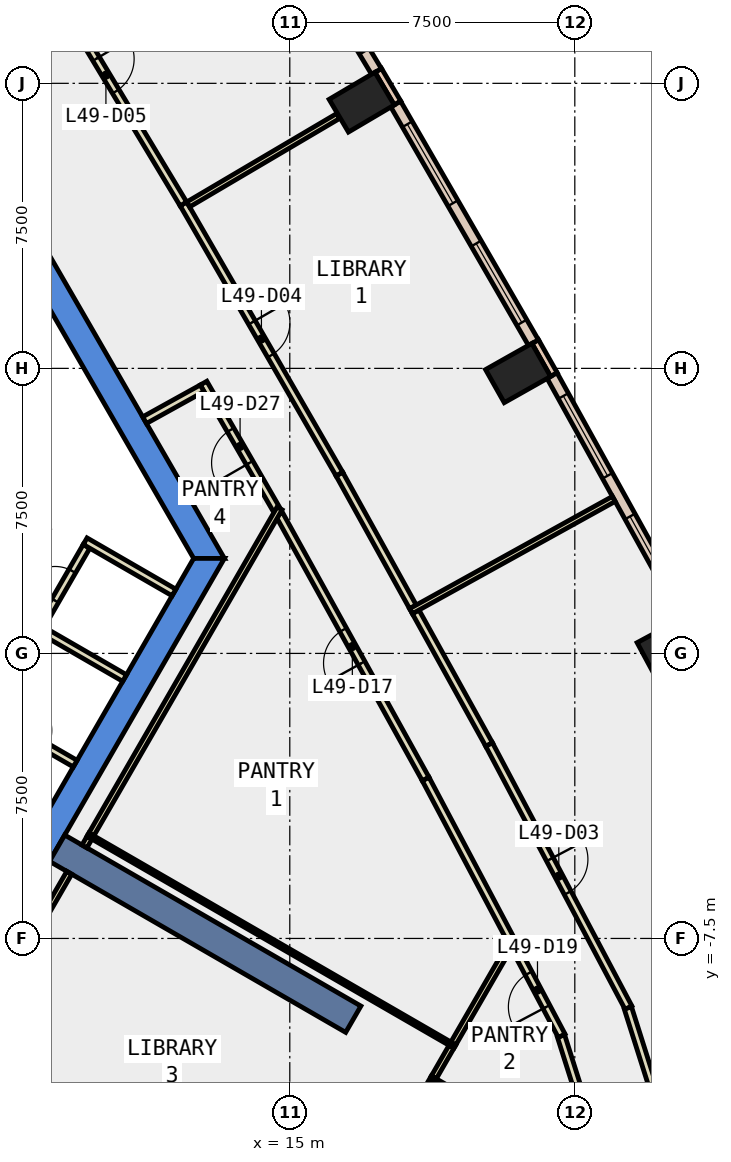
"""IFC4 building model, lengths in metres.
Left out: names, types, materials, properties, quantities, classifications, styles, units other than length and angle.
Written with IfcOpenShell. Run it as: python <this file> out.ifc"""

import sys

from ifc_helpers import new_model, si_unit, direction, frame, frame_2d, origin, origin_2d, place, context, subcontext, project, spatial, polyline, rectangle, outline, extrude, element, fill, save


model = new_model("IFC4")
c1 = context("Model", 3, precision=1e-05, world=origin(), true_north=direction((0.0, 1.0)))
c2 = subcontext(c1, "Body", "Model", "MODEL_VIEW")
j1 = project(units=[si_unit("LENGTHUNIT", "METRE"), si_unit("PLANEANGLEUNIT", "RADIAN")], contexts=[c1])
p1 = place(None, origin())
s1 = spatial("IfcSite", under=j1, at=p1, CompositionType="ELEMENT")
p2 = place(p1, origin())
s2 = spatial("IfcBuilding", under=s1, at=p2, CompositionType="ELEMENT")
p3 = place(p2, frame((0.0, 0.0, 219.2)))
s3 = spatial("IfcBuildingStorey", under=s2, at=p3, CompositionType="ELEMENT", Elevation=219.2)
for number, where, z_axis, x_axis in (
    (1, (24.993, 0.175, -0.4), (0.0, 0.0, 1.0), (-0.474, 0.88, 0.0)),
    (2, (21.007, 7.377, -0.4), (0.0, 0.0, 1.0), (-0.491, 0.871, 0.0)),
    (3, (16.892, 14.504, -0.4), (0.0, 0.0, 1.0), (-0.509, 0.861, 0.0)),
):
    element("IfcColumn", number, at=place(p3, frame(where, z_axis=z_axis, x_axis=x_axis)), inside=s3, PredefinedType="COLUMN", context=c2, shape_type="SweptSolid", body=[
        extrude(rectangle(XDim=1.0, YDim=1.4, at=origin_2d()), origin(), (0.0, 0.0, 1.0), 4.2),
    ])
p4 = place(p3, frame((0.0, 0.0, -0.4)))
e4 = element("IfcWall", 4, at=p4, inside=s3, PredefinedType="SHEAR", context=c2, shape_type="SweptSolid", body=[
    extrude(outline(polyline([(8.084, 11.498), (7.478, 11.148), (12.471, 2.5), (13.279, 2.5), (8.084, 11.498)])), origin(), (0.0, 0.0, 1.0), 4.2),
])
p5 = place(p3, frame((0.0, 0.0, -0.4)))
e5 = element("IfcWall", 5, at=p5, inside=s3, PredefinedType="SHEAR", context=c2, shape_type="SweptSolid", body=[
    extrude(outline(polyline([(6.64, -9.0), (13.279, 2.5), (12.471, 2.5), (6.235, -8.3), (6.64, -9.0)])), origin(), (0.0, 0.0, 1.0), 4.2),
])
p6 = place(p3, frame((8.877, -5.125, -0.4), z_axis=(0.0, 0.0, 1.0), x_axis=(0.866017533419, -0.500013631625, 0.0)))
e6 = element("IfcWall", 6, at=p6, inside=s3, PredefinedType="SHEAR", context=c2, shape_type="SweptSolid", body=[
    extrude(rectangle(XDim=9.0, YDim=0.8, at=frame_2d((4.5, 0.0))), origin(), (0.0, 0.0, 1.0), 4.2),
])
p7 = place(p3, frame((21.95, 7.334, 0.0), z_axis=(0.0, 0.0, 1.0), x_axis=(-0.491743606947, 0.87074004446, 0.0)))
e7 = element("IfcWall", 7, at=p7, inside=s3, PredefinedType="STANDARD", context=c2, shape_type="SweptSolid", body=[
    extrude(rectangle(XDim=1.0, YDim=0.2, at=frame_2d((0.5, 0.0))), origin(), (0.0, 0.0, 1.0), 3.8),
])
p8 = place(p3, frame((17.835, 14.481, 0.0), z_axis=(0.0, 0.0, 1.0), x_axis=(-0.508161541526, 0.861261776531, 0.0)))
e8 = element("IfcWall", 8, at=p8, inside=s3, PredefinedType="STANDARD", context=c2, shape_type="SweptSolid", body=[
    extrude(rectangle(XDim=1.0, YDim=0.2, at=frame_2d((0.5, 0.0))), origin(), (0.0, 0.0, 1.0), 3.8),
])
p9 = place(p3, frame((25.411, 0.968, 0.0), z_axis=(0.0, 0.0, 1.0), x_axis=(-0.484163461668, 0.87497756679, 0.0)))
e9 = element("IfcWall", 9, at=p9, inside=s3, PredefinedType="STANDARD", context=c2, shape_type="SweptSolid", body=[
    extrude(rectangle(XDim=7.247, YDim=0.3, at=frame_2d((3.624, 0.0))), origin(), (0.0, 0.0, 1.0), 3.8),
])
p10 = place(p9, frame((0.612, 0.0, 0.9)))
e10 = element("IfcOpeningElement", 10, at=p10, cuts=e9, PredefinedType="OPENING", context=c2, shape_type="SweptSolid", body=[
    extrude(rectangle(XDim=2.4, YDim=2.6, at=frame_2d((1.2, 1.3))), frame((0.0, 0.16, 0.0), z_axis=(0.0, -1.0, 0.0), x_axis=(1.0, 0.0, 0.0)), (0.0, 0.0, 1.0), 0.32),
])
p11 = place(p9, frame((4.235, 0.0, 0.9)))
e11 = element("IfcOpeningElement", 11, at=p11, cuts=e9, PredefinedType="OPENING", context=c2, shape_type="SweptSolid", body=[
    extrude(rectangle(XDim=2.4, YDim=2.6, at=frame_2d((1.2, 1.3))), frame((0.0, 0.16, 0.0), z_axis=(0.0, -1.0, 0.0), x_axis=(1.0, 0.0, 0.0)), (0.0, 0.0, 1.0), 0.32),
])
p12 = place(p3, frame((21.411, 8.177, 0.0), z_axis=(0.0, 0.0, 1.0), x_axis=(-0.499968351115, 0.866043675505, 0.0)))
e12 = element("IfcWall", 12, at=p12, inside=s3, PredefinedType="STANDARD", context=c2, shape_type="SweptSolid", body=[
    extrude(rectangle(XDim=7.248, YDim=0.3, at=frame_2d((3.624, 0.0))), origin(), (0.0, 0.0, 1.0), 3.8),
])
p13 = place(p12, frame((0.612, 0.0, 0.9)))
e13 = element("IfcOpeningElement", 13, at=p13, cuts=e12, PredefinedType="OPENING", context=c2, shape_type="SweptSolid", body=[
    extrude(rectangle(XDim=2.4, YDim=2.6, at=frame_2d((1.2, 1.3))), frame((0.0, 0.16, 0.0), z_axis=(0.0, -1.0, 0.0), x_axis=(1.0, 0.0, 0.0)), (0.0, 0.0, 1.0), 0.32),
])
p14 = place(p12, frame((4.236, 0.0, 0.9)))
e14 = element("IfcOpeningElement", 14, at=p14, cuts=e12, PredefinedType="OPENING", context=c2, shape_type="SweptSolid", body=[
    extrude(rectangle(XDim=2.4, YDim=2.6, at=frame_2d((1.2, 1.3))), frame((0.0, 0.16, 0.0), z_axis=(0.0, -1.0, 0.0), x_axis=(1.0, 0.0, 0.0)), (0.0, 0.0, 1.0), 0.32),
])
p15 = place(p3, frame((17.281, 15.313, 0.0), z_axis=(0.0, 0.0, 1.0), x_axis=(-0.515560283412, 0.856853309597, 0.0)))
e15 = element("IfcWall", 15, at=p15, inside=s3, PredefinedType="STANDARD", context=c2, shape_type="SweptSolid", body=[
    extrude(rectangle(XDim=7.249, YDim=0.3, at=frame_2d((3.624, 0.0))), origin(), (0.0, 0.0, 1.0), 3.8),
])
p16 = place(p15, frame((0.612, 0.0, 0.9)))
e16 = element("IfcOpeningElement", 16, at=p16, cuts=e15, PredefinedType="OPENING", context=c2, shape_type="SweptSolid", body=[
    extrude(rectangle(XDim=2.4, YDim=2.6, at=frame_2d((1.2, 1.3))), frame((0.0, 0.16, 0.0), z_axis=(0.0, -1.0, 0.0), x_axis=(1.0, 0.0, 0.0)), (0.0, 0.0, 1.0), 0.32),
])
p17 = place(p15, frame((4.236, 0.0, 0.9)))
e17 = element("IfcOpeningElement", 17, at=p17, cuts=e15, PredefinedType="OPENING", context=c2, shape_type="SweptSolid", body=[
    extrude(rectangle(XDim=2.4, YDim=2.6, at=frame_2d((1.2, 1.3))), frame((0.0, 0.16, 0.0), z_axis=(0.0, -1.0, 0.0), x_axis=(1.0, 0.0, 0.0)), (0.0, 0.0, 1.0), 0.32),
])
p18 = place(p3, frame((14.652, 3.783, 0.0), z_axis=(0.0, 0.0, 1.0), x_axis=(-0.499821427992, 0.866128477837, 0.0)))
e18 = element("IfcWall", 18, at=p18, inside=s3, PredefinedType="PARTITIONING", context=c2, shape_type="SweptSolid", body=[
    extrude(rectangle(XDim=3.844, YDim=0.2, at=frame_2d((1.922, 0.0))), origin(), (0.0, 0.0, 1.0), 3.8),
])
p19 = place(p18, frame((1.421, 0.0, 0.0)))
e19 = element("IfcOpeningElement", 19, at=p19, cuts=e18, PredefinedType="OPENING", context=c2, shape_type="SweptSolid", body=[
    extrude(rectangle(XDim=1.0, YDim=2.1, at=frame_2d((0.5, 1.05))), frame((0.0, 0.11, 0.0), z_axis=(0.0, -1.0, 0.0), x_axis=(1.0, 0.0, 0.0)), (0.0, 0.0, 1.0), 0.22),
])
p20 = place(p3, frame((12.693, 6.976, 0.0), z_axis=(0.0, 0.0, 1.0), x_axis=(-0.874908151187, -0.484288887944, 0.0)))
e20 = element("IfcWall", 20, at=p20, inside=s3, PredefinedType="PARTITIONING", context=c2, shape_type="SweptSolid", body=[
    extrude(rectangle(XDim=1.731, YDim=0.2, at=frame_2d((0.865, 0.0))), origin(), (0.0, 0.0, 1.0), 3.8),
])
p21 = place(p3, frame((20.882, -7.659, 0.0), z_axis=(0.0, 0.0, 1.0), x_axis=(-0.468206254133, 0.883619207346, 0.0)))
e21 = element("IfcWall", 21, at=p21, inside=s3, PredefinedType="PARTITIONING", context=c2, shape_type="SweptSolid", body=[
    extrude(rectangle(XDim=4.93, YDim=0.2, at=frame_2d((2.465, 0.0))), origin(), (0.0, 0.0, 1.0), 3.8),
])
p22 = place(p3, frame((18.574, -3.303, 0.0), z_axis=(0.0, 0.0, 1.0), x_axis=(-0.484239190765, 0.874935658279, 0.0)))
e22 = element("IfcWall", 22, at=p22, inside=s3, PredefinedType="PARTITIONING", context=c2, shape_type="SweptSolid", body=[
    extrude(rectangle(XDim=7.963, YDim=0.2, at=frame_2d((3.981, 0.0))), origin(), (0.0, 0.0, 1.0), 3.8),
])
p23 = place(p22, frame((3.482, 0.0, 0.0)))
e23 = element("IfcOpeningElement", 23, at=p23, cuts=e22, PredefinedType="OPENING", context=c2, shape_type="SweptSolid", body=[
    extrude(rectangle(XDim=1.0, YDim=2.1, at=frame_2d((0.5, 1.05))), frame((0.0, 0.11, 0.0), z_axis=(0.0, -1.0, 0.0), x_axis=(1.0, 0.0, 0.0)), (0.0, 0.0, 1.0), 0.22),
])
p24 = place(p3, frame((22.833, -12.262, 0.0), z_axis=(0.0, 0.0, 1.0), x_axis=(-0.302262657712, 0.953224677478, 0.0)))
e24 = element("IfcWall", 24, at=p24, inside=s3, PredefinedType="PARTITIONING", context=c2, shape_type="SweptSolid", body=[
    extrude(rectangle(XDim=2.303, YDim=0.2, at=frame_2d((1.151, 0.0))), origin(), (0.0, 0.0, 1.0), 3.8),
])
p25 = place(p3, frame((22.154, -10.06, 0.0), z_axis=(0.0, 0.0, 1.0), x_axis=(-0.468114756541, 0.883667683413, 0.0)))
e25 = element("IfcWall", 25, at=p25, inside=s3, PredefinedType="PARTITIONING", context=c2, shape_type="SweptSolid", body=[
    extrude(rectangle(XDim=2.717, YDim=0.2, at=frame_2d((1.359, 0.0))), origin(), (0.0, 0.0, 1.0), 3.8),
])
p26 = place(p25, frame((0.859, 0.0, 0.0)))
e26 = element("IfcOpeningElement", 26, at=p26, cuts=e25, PredefinedType="OPENING", context=c2, shape_type="SweptSolid", body=[
    extrude(rectangle(XDim=1.0, YDim=2.1, at=frame_2d((0.5, 1.05))), frame((0.0, 0.11, 0.0), z_axis=(0.0, -1.0, 0.0), x_axis=(1.0, 0.0, 0.0)), (0.0, 0.0, 1.0), 0.22),
])
p27 = place(p3, frame((18.312, 1.094, 0.0), z_axis=(0.0, 0.0, 1.0), x_axis=(0.484328424129, -0.874886265511, 0.0)))
e27 = element("IfcWall", 27, at=p27, inside=s3, PredefinedType="PARTITIONING", context=c2, shape_type="SweptSolid", body=[
    extrude(rectangle(XDim=3.991, YDim=0.2, at=frame_2d((1.996, 0.0))), origin(), (0.0, 0.0, 1.0), 3.8),
])
p28 = place(p3, frame((20.245, -2.398, 0.0), z_axis=(0.0, 0.0, 1.0), x_axis=(0.468063775621, -0.883694688199, 0.0)))
e28 = element("IfcWall", 28, at=p28, inside=s3, PredefinedType="PARTITIONING", context=c2, shape_type="SweptSolid", body=[
    extrude(rectangle(XDim=7.836, YDim=0.2, at=frame_2d((3.918, 0.0))), origin(), (0.0, 0.0, 1.0), 3.8),
])
p29 = place(p28, frame((3.418, 0.0, 0.0)))
e29 = element("IfcOpeningElement", 29, at=p29, cuts=e28, PredefinedType="OPENING", context=c2, shape_type="SweptSolid", body=[
    extrude(rectangle(XDim=1.0, YDim=2.1, at=frame_2d((0.5, 1.05))), frame((0.0, 0.11, 0.0), z_axis=(0.0, -1.0, 0.0), x_axis=(1.0, 0.0, 0.0)), (0.0, 0.0, 1.0), 0.22),
])
p30 = place(p3, frame((23.897, -9.33, 0.0), z_axis=(0.0, 0.0, 1.0), x_axis=(0.302200639646, -0.953244340868, 0.0)))
e30 = element("IfcWall", 30, at=p30, inside=s3, PredefinedType="PARTITIONING", context=c2, shape_type="SweptSolid", body=[
    extrude(rectangle(XDim=3.004, YDim=0.2, at=frame_2d((1.502, 0.0))), origin(), (0.0, 0.0, 1.0), 3.8),
])
p31 = place(p3, frame((12.202, 11.828, 0.0), z_axis=(0.0, 0.0, 1.0), x_axis=(0.499919823193, -0.866071688937, 0.0)))
e31 = element("IfcWall", 31, at=p31, inside=s3, PredefinedType="PARTITIONING", context=c2, shape_type="SweptSolid", body=[
    extrude(rectangle(XDim=8.209, YDim=0.2, at=frame_2d((4.104, 0.0))), origin(), (0.0, 0.0, 1.0), 3.8),
])
p32 = place(p31, frame((3.604, 0.0, 0.0)))
e32 = element("IfcOpeningElement", 32, at=p32, cuts=e31, PredefinedType="OPENING", context=c2, shape_type="SweptSolid", body=[
    extrude(rectangle(XDim=1.0, YDim=2.1, at=frame_2d((0.5, 1.05))), frame((0.0, 0.11, 0.0), z_axis=(0.0, -1.0, 0.0), x_axis=(1.0, 0.0, 0.0)), (0.0, 0.0, 1.0), 0.22),
])
p33 = place(p3, frame((16.306, 4.718, 0.0), z_axis=(0.0, 0.0, 1.0), x_axis=(0.484411997038, -0.874839995156, 0.0)))
e33 = element("IfcWall", 33, at=p33, inside=s3, PredefinedType="PARTITIONING", context=c2, shape_type="SweptSolid", body=[
    extrude(rectangle(XDim=3.993, YDim=0.2, at=frame_2d((1.996, 0.0))), origin(), (0.0, 0.0, 1.0), 3.8),
])
p34 = place(p3, frame((8.046, 18.732, 0.0), z_axis=(0.0, 0.0, 1.0), x_axis=(0.515502328211, -0.856888178007, 0.0)))
e34 = element("IfcWall", 34, at=p34, inside=s3, PredefinedType="PARTITIONING", context=c2, shape_type="SweptSolid", body=[
    extrude(rectangle(XDim=8.058, YDim=0.2, at=frame_2d((4.029, 0.0))), origin(), (0.0, 0.0, 1.0), 3.8),
])
p35 = place(p34, frame((3.604, 0.0, 0.0)))
e35 = element("IfcOpeningElement", 35, at=p35, cuts=e34, PredefinedType="OPENING", context=c2, shape_type="SweptSolid", body=[
    extrude(rectangle(XDim=1.0, YDim=2.1, at=frame_2d((0.5, 1.05))), frame((0.0, 0.11, 0.0), z_axis=(0.0, -1.0, 0.0), x_axis=(1.0, 0.0, 0.0)), (0.0, 0.0, 1.0), 0.22),
])
p36 = place(p3, frame((6.841, -1.451, 0.0), z_axis=(0.0, 0.0, 1.0), x_axis=(0.866220623736, -0.499661716578, 0.0)))
e36 = element("IfcWall", 36, at=p36, inside=s3, PredefinedType="PARTITIONING", context=c2, shape_type="SweptSolid", body=[
    extrude(rectangle(XDim=2.9, YDim=0.2, at=frame_2d((1.45, 0.0))), origin(), (0.0, 0.0, 1.0), 3.8),
])
p37 = place(p36, frame((1.15, 0.0, 0.0)))
e37 = element("IfcOpeningElement", 37, at=p37, cuts=e36, PredefinedType="OPENING", context=c2, shape_type="SweptSolid", body=[
    extrude(rectangle(XDim=0.9, YDim=2.1, at=frame_2d((0.45, 1.05))), frame((0.0, 0.11, 0.0), z_axis=(0.0, -1.0, 0.0), x_axis=(1.0, 0.0, 0.0)), (0.0, 0.0, 1.0), 0.22),
])
p38 = place(p3, frame((10.653, -0.648, 0.0), z_axis=(0.0, 0.0, 1.0), x_axis=(-0.866036505625, 0.499980770555, 0.0)))
e38 = element("IfcWall", 38, at=p38, inside=s3, PredefinedType="PARTITIONING", context=c2, shape_type="SweptSolid", body=[
    extrude(rectangle(XDim=2.7, YDim=0.2, at=frame_2d((1.35, 0.0))), origin(), (0.0, 0.0, 1.0), 3.8),
])
p39 = place(p3, frame((8.451, 0.738, 0.0), z_axis=(0.0, 0.0, 1.0), x_axis=(0.499913221443, 0.866075499611, 0.0)))
e39 = element("IfcWall", 39, at=p39, inside=s3, PredefinedType="PARTITIONING", context=c2, shape_type="SweptSolid", body=[
    extrude(rectangle(XDim=2.4, YDim=0.2, at=frame_2d((1.2, 0.0))), origin(), (0.0, 0.0, 1.0), 3.8),
])
p40 = place(p39, frame((0.75, 0.0, 0.0)))
e40 = element("IfcOpeningElement", 40, at=p40, cuts=e39, PredefinedType="OPENING", context=c2, shape_type="SweptSolid", body=[
    extrude(rectangle(XDim=0.9, YDim=2.1, at=frame_2d((0.45, 1.05))), frame((0.0, 0.11, 0.0), z_axis=(0.0, -1.0, 0.0), x_axis=(1.0, 0.0, 0.0)), (0.0, 0.0, 1.0), 0.22),
])
p41 = place(p3, frame((9.615, 2.953, 0.0), z_axis=(0.0, 0.0, 1.0), x_axis=(0.866013897511, -0.50001992892, 0.0)))
e41 = element("IfcWall", 41, at=p41, inside=s3, PredefinedType="PARTITIONING", context=c2, shape_type="SweptSolid", body=[
    extrude(rectangle(XDim=2.7, YDim=0.2, at=frame_2d((1.35, 0.0))), origin(), (0.0, 0.0, 1.0), 3.8),
])
p42 = place(p3, frame((7.283, -9.086, 0.0), z_axis=(0.0, 0.0, 1.0), x_axis=(0.500035303972, 0.866005020067, 0.0)))
e42 = element("IfcWall", 42, at=p42, inside=s3, PredefinedType="PARTITIONING", context=c2, shape_type="SweptSolid", body=[
    extrude(rectangle(XDim=3.828, YDim=0.15, at=frame_2d((1.914, 0.0))), origin(), (0.0, 0.0, 1.0), 3.8),
])
p43 = place(p3, frame((9.779, -4.762, 0.0), z_axis=(0.0, 0.0, 1.0), x_axis=(0.499990552429, 0.866030858274, 0.0)))
e43 = element("IfcWall", 43, at=p43, inside=s3, PredefinedType="PARTITIONING", context=c2, shape_type="SweptSolid", body=[
    extrude(rectangle(XDim=9.906, YDim=0.15, at=frame_2d((4.953, 0.0))), origin(), (0.0, 0.0, 1.0), 3.8),
])
p44 = place(p3, frame((9.689, -4.768, 0.0), z_axis=(0.0, 0.0, 1.0), x_axis=(0.866023322577, -0.500003604739, 0.0)))
e44 = element("IfcWall", 44, at=p44, inside=s3, PredefinedType="PARTITIONING", context=c2, shape_type="SweptSolid", body=[
    extrude(rectangle(XDim=11.15, YDim=0.1, at=frame_2d((5.575, 0.0))), origin(), (0.0, 0.0, 1.0), 3.8),
])
p45 = place(p3, frame((18.789, -11.156, 0.0), z_axis=(0.0, 0.0, 1.0), x_axis=(-0.499822078765, -0.866128102292, 0.0)))
e45 = element("IfcWall", 45, at=p45, inside=s3, PredefinedType="PARTITIONING", context=c2, shape_type="SweptSolid", body=[
    extrude(rectangle(XDim=4.313, YDim=0.15, at=frame_2d((2.157, 0.0))), origin(), (0.0, 0.0, 1.0), 3.8),
])
p46 = place(p3, frame((19.255, -10.349, 0.0), z_axis=(0.0, 0.0, 1.0), x_axis=(-0.499185199876, -0.866495318063, 0.0)))
e46 = element("IfcWall", 46, at=p46, inside=s3, PredefinedType="PARTITIONING", context=c2, shape_type="SweptSolid", body=[
    extrude(rectangle(XDim=0.931, YDim=0.15, at=frame_2d((0.466, 0.0))), origin(), (0.0, 0.0, 1.0), 3.8),
])
p47 = place(p3, frame((20.847, -7.593, 0.0), z_axis=(0.0, 0.0, 1.0), x_axis=(-0.500261762561, -0.865874222343, 0.0)))
e47 = element("IfcWall", 47, at=p47, inside=s3, PredefinedType="PARTITIONING", context=c2, shape_type="SweptSolid", body=[
    extrude(rectangle(XDim=3.082, YDim=0.15, at=frame_2d((1.541, 0.0))), origin(), (0.0, 0.0, 1.0), 3.8),
])
p48 = place(p3, frame((18.765, -11.199, 0.0), z_axis=(0.0, 0.0, 1.0), x_axis=(0.866038964406, -0.499976511579, 0.0)))
e48 = element("IfcWall", 48, at=p48, inside=s3, PredefinedType="PARTITIONING", context=c2, shape_type="SweptSolid", body=[
    extrude(rectangle(XDim=4.242, YDim=0.1, at=frame_2d((2.121, 0.0))), origin(), (0.0, 0.0, 1.0), 3.8),
])
p49 = place(p3, frame((18.189, 1.111, 0.0), z_axis=(0.0, 0.0, 1.0), x_axis=(0.874928335558, 0.484252421405, 0.0)))
e49 = element("IfcWall", 49, at=p49, inside=s3, PredefinedType="PARTITIONING", context=c2, shape_type="SweptSolid", body=[
    extrude(rectangle(XDim=6.1, YDim=0.15, at=frame_2d((3.05, 0.0))), origin(), (0.0, 0.0, 1.0), 3.8),
])
p50 = place(p3, frame((12.326, 11.813, 0.0), z_axis=(0.0, 0.0, 1.0), x_axis=(0.861428100003, 0.507879541353, 0.0)))
e50 = element("IfcWall", 50, at=p50, inside=s3, PredefinedType="PARTITIONING", context=c2, shape_type="SweptSolid", body=[
    extrude(rectangle(XDim=4.58, YDim=0.15, at=frame_2d((2.29, 0.0))), origin(), (0.0, 0.0, 1.0), 3.8),
])
p51 = place(p3, frame((9.596, -5.079, 0.0), z_axis=(0.0, 0.0, 1.0), x_axis=(0.500782702656, 0.865573038351, 0.0)))
e51 = element("IfcWall", 51, at=p51, inside=s3, PredefinedType="PARTITIONING", context=c2, shape_type="SweptSolid", body=[
    extrude(rectangle(XDim=0.266, YDim=0.15, at=frame_2d((0.133, 0.0))), origin(), (0.0, 0.0, 1.0), 3.8),
])
p52 = place(p10, origin())
e52 = element("IfcWindow", 52, at=p52, inside=s3, PartitioningType="SINGLE_PANEL", PredefinedType="WINDOW", context=c2, shape_type="SweptSolid", body=[
    extrude(rectangle(XDim=2.4, YDim=2.6, at=frame_2d((1.2, 1.3))), frame((0.0, 0.03, 0.0), z_axis=(0.0, -1.0, 0.0), x_axis=(1.0, 0.0, 0.0)), (0.0, 0.0, 1.0), 0.06),
])
fill(e10, e52)
p53 = place(p11, origin())
e53 = element("IfcWindow", 53, at=p53, inside=s3, PartitioningType="SINGLE_PANEL", PredefinedType="WINDOW", context=c2, shape_type="SweptSolid", body=[
    extrude(rectangle(XDim=2.4, YDim=2.6, at=frame_2d((1.2, 1.3))), frame((0.0, 0.03, 0.0), z_axis=(0.0, -1.0, 0.0), x_axis=(1.0, 0.0, 0.0)), (0.0, 0.0, 1.0), 0.06),
])
fill(e11, e53)
p54 = place(p13, origin())
e54 = element("IfcWindow", 54, at=p54, inside=s3, PartitioningType="SINGLE_PANEL", PredefinedType="WINDOW", context=c2, shape_type="SweptSolid", body=[
    extrude(rectangle(XDim=2.4, YDim=2.6, at=frame_2d((1.2, 1.3))), frame((0.0, 0.03, 0.0), z_axis=(0.0, -1.0, 0.0), x_axis=(1.0, 0.0, 0.0)), (0.0, 0.0, 1.0), 0.06),
])
fill(e13, e54)
p55 = place(p14, origin())
e55 = element("IfcWindow", 55, at=p55, inside=s3, PartitioningType="SINGLE_PANEL", PredefinedType="WINDOW", context=c2, shape_type="SweptSolid", body=[
    extrude(rectangle(XDim=2.4, YDim=2.6, at=frame_2d((1.2, 1.3))), frame((0.0, 0.03, 0.0), z_axis=(0.0, -1.0, 0.0), x_axis=(1.0, 0.0, 0.0)), (0.0, 0.0, 1.0), 0.06),
])
fill(e14, e55)
p56 = place(p29, origin())
e56 = element("IfcDoor", 56, at=p56, inside=s3, OperationType="SINGLE_SWING_LEFT", PredefinedType="DOOR", context=c2, shape_type="SweptSolid", body=[
    extrude(rectangle(XDim=1.0, YDim=2.1, at=frame_2d((0.5, 1.05))), frame((0.0, 0.025, 0.0), z_axis=(0.0, -1.0, 0.0), x_axis=(1.0, 0.0, 0.0)), (0.0, 0.0, 1.0), 0.05),
])
fill(e29, e56)
p57 = place(p32, origin())
e57 = element("IfcDoor", 57, at=p57, inside=s3, OperationType="SINGLE_SWING_RIGHT", PredefinedType="DOOR", context=c2, shape_type="SweptSolid", body=[
    extrude(rectangle(XDim=1.0, YDim=2.1, at=frame_2d((0.5, 1.05))), frame((0.0, 0.025, 0.0), z_axis=(0.0, -1.0, 0.0), x_axis=(1.0, 0.0, 0.0)), (0.0, 0.0, 1.0), 0.05),
])
fill(e32, e57)
p58 = place(p35, origin())
e58 = element("IfcDoor", 58, at=p58, inside=s3, OperationType="SINGLE_SWING_RIGHT", PredefinedType="DOOR", context=c2, shape_type="SweptSolid", body=[
    extrude(rectangle(XDim=1.0, YDim=2.1, at=frame_2d((0.5, 1.05))), frame((0.0, 0.025, 0.0), z_axis=(0.0, -1.0, 0.0), x_axis=(1.0, 0.0, 0.0)), (0.0, 0.0, 1.0), 0.05),
])
fill(e35, e58)
p59 = place(p23, origin())
e59 = element("IfcDoor", 59, at=p59, inside=s3, OperationType="SINGLE_SWING_LEFT", PredefinedType="DOOR", context=c2, shape_type="SweptSolid", body=[
    extrude(rectangle(XDim=1.0, YDim=2.1, at=frame_2d((0.5, 1.05))), frame((0.0, 0.025, 0.0), z_axis=(0.0, -1.0, 0.0), x_axis=(1.0, 0.0, 0.0)), (0.0, 0.0, 1.0), 0.05),
])
fill(e23, e59)
p60 = place(p26, origin())
e60 = element("IfcDoor", 60, at=p60, inside=s3, OperationType="SINGLE_SWING_LEFT", PredefinedType="DOOR", context=c2, shape_type="SweptSolid", body=[
    extrude(rectangle(XDim=1.0, YDim=2.1, at=frame_2d((0.5, 1.05))), frame((0.0, 0.025, 0.0), z_axis=(0.0, -1.0, 0.0), x_axis=(1.0, 0.0, 0.0)), (0.0, 0.0, 1.0), 0.05),
])
fill(e26, e60)
p61 = place(p19, origin())
e61 = element("IfcDoor", 61, at=p61, inside=s3, OperationType="SINGLE_SWING_LEFT", PredefinedType="DOOR", context=c2, shape_type="SweptSolid", body=[
    extrude(rectangle(XDim=1.0, YDim=2.1, at=frame_2d((0.5, 1.05))), frame((0.0, 0.025, 0.0), z_axis=(0.0, -1.0, 0.0), x_axis=(1.0, 0.0, 0.0)), (0.0, 0.0, 1.0), 0.05),
])
fill(e19, e61)
p62 = place(p40, origin())
e62 = element("IfcDoor", 62, at=p62, inside=s3, OperationType="SINGLE_SWING_LEFT", PredefinedType="DOOR", context=c2, shape_type="SweptSolid", body=[
    extrude(rectangle(XDim=0.9, YDim=2.1, at=frame_2d((0.45, 1.05))), frame((0.0, 0.025, 0.0), z_axis=(0.0, -1.0, 0.0), x_axis=(1.0, 0.0, 0.0)), (0.0, 0.0, 1.0), 0.05),
])
fill(e40, e62)
save(model, sys.argv[1])
